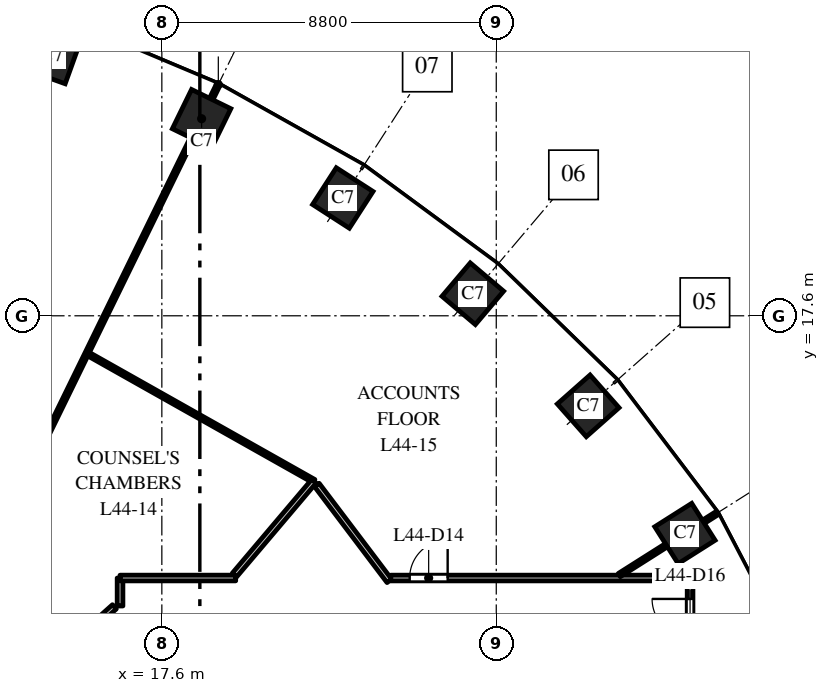
"""IFC4 building model, lengths in metres.
Left out: names, types, materials, properties, quantities, classifications, styles, units other than length and angle.
Written with IfcOpenShell. Run it as: python <this file> out.ifc"""

import sys

from ifc_helpers import new_model, si_unit, direction, frame, frame_2d, origin, origin_2d, place, context, subcontext, project, spatial, rectangle, extrude, element, fill, save


model = new_model("IFC4")
c1 = context("Model", 3, precision=1e-05, world=origin(), true_north=direction((0.0, 1.0)))
c2 = subcontext(c1, "Body", "Model", "MODEL_VIEW")
j1 = project(units=[si_unit("LENGTHUNIT", "METRE"), si_unit("PLANEANGLEUNIT", "RADIAN")], contexts=[c1])
p1 = place(None, origin())
s1 = spatial("IfcSite", under=j1, at=p1, CompositionType="ELEMENT")
p2 = place(p1, origin())
s2 = spatial("IfcBuilding", under=s1, at=p2, CompositionType="ELEMENT")
p3 = place(p2, frame((0.0, 0.0, 190.0)))
s3 = spatial("IfcBuildingStorey", under=s2, at=p3, CompositionType="ELEMENT", Elevation=190.0)
for number, where, z_axis, x_axis in (
    (1, (31.365, 11.871, 0.0), (0.0, 0.0, 1.0), (-0.535, 0.845, 0.0)),
    (2, (28.819, 15.23, 0.0), (0.0, 0.0, 1.0), (-0.663, 0.749, 0.0)),
    (3, (25.783, 18.18, 0.0), (0.0, 0.0, 1.0), (-0.763, 0.646, 0.0)),
    (4, (22.362, 20.7, 0.0), (0.0, 0.0, 1.0), (-0.84, 0.542, 0.0)),
    (5, (18.646, 22.785, 0.0), (0.0, 0.0, 1.0), (-0.898, 0.439, 0.0)),
    (6, (14.709, 24.441, 0.0), (0.0, 0.0, 1.0), (-0.941, 0.338, 0.0)),
):
    element("IfcColumn", number, at=place(p3, frame(where, z_axis=z_axis, x_axis=x_axis)), inside=s3, PredefinedType="COLUMN", context=c2, shape_type="SweptSolid", body=[
        extrude(rectangle(XDim=1.15, YDim=1.15, at=origin_2d()), origin(), (0.0, 0.0, 1.0), 4.0),
    ])
p4 = place(p3, frame((12.769, 10.765, 0.0), z_axis=(0.0, 0.0, 1.0), x_axis=(0.439230835686, 0.898374238824, 0.0)))
e7 = element("IfcWall", 7, at=p4, inside=s3, PredefinedType="PARTITIONING", context=c2, shape_type="SweptSolid", body=[
    extrude(rectangle(XDim=14.382, YDim=0.1, at=frame_2d((7.191, 0.0))), origin(), (0.0, 0.0, 1.0), 2.9),
])
p5 = place(p3, frame((15.673, 16.589, 0.0), z_axis=(0.0, 0.0, 1.0), x_axis=(0.871231423664, -0.490872495074, 0.0)))
e8 = element("IfcWall", 8, at=p5, inside=s3, PredefinedType="PARTITIONING", context=c2, shape_type="SweptSolid", body=[
    extrude(rectangle(XDim=6.806, YDim=0.1, at=frame_2d((3.403, 0.0))), origin(), (0.0, 0.0, 1.0), 3.7),
])
p6 = place(p3, frame((16.5, 9.964, 0.0), z_axis=(0.0, 0.0, 1.0), x_axis=(0.0, 1.0, 0.0)))
e9 = element("IfcWall", 9, at=p6, inside=s3, PredefinedType="PARTITIONING", context=c2, shape_type="SweptSolid", body=[
    extrude(rectangle(XDim=0.736, YDim=0.15, at=frame_2d((0.368, 0.0))), origin(), (0.0, 0.0, 1.0), 3.7),
])
p7 = place(p3, frame((16.5, 10.7, 0.0), z_axis=(0.0, 0.0, 1.0), x_axis=(1.0, 0.0, 0.0)))
e10 = element("IfcWall", 10, at=p7, inside=s3, PredefinedType="PARTITIONING", context=c2, shape_type="SweptSolid", body=[
    extrude(rectangle(XDim=3.043, YDim=0.15, at=frame_2d((1.521, 0.0))), origin(), (0.0, 0.0, 1.0), 3.7),
])
p8 = place(p3, frame((19.511, 10.778, 0.0), z_axis=(0.0, 0.0, 1.0), x_axis=(0.646314086505, 0.763071491792, 0.0)))
e11 = element("IfcWall", 11, at=p8, inside=s3, PredefinedType="PARTITIONING", context=c2, shape_type="SweptSolid", body=[
    extrude(rectangle(XDim=3.237, YDim=0.15, at=frame_2d((1.618, 0.0))), origin(), (0.0, 0.0, 1.0), 3.7),
])
p9 = place(p3, frame((21.679, 13.148, 0.0), z_axis=(0.0, 0.0, 1.0), x_axis=(0.602984875358, -0.797752618353, 0.0)))
e12 = element("IfcWall", 12, at=p9, inside=s3, PredefinedType="PARTITIONING", context=c2, shape_type="SweptSolid", body=[
    extrude(rectangle(XDim=3.163, YDim=0.15, at=frame_2d((1.581, 0.0))), origin(), (0.0, 0.0, 1.0), 2.75),
])
p10 = place(p3, frame((23.623, 10.7, 0.0), z_axis=(0.0, 0.0, 1.0), x_axis=(1.0, 0.0, 0.0)))
e13 = element("IfcWall", 13, at=p10, inside=s3, PredefinedType="PARTITIONING", context=c2, shape_type="SweptSolid", body=[
    extrude(rectangle(XDim=7.877, YDim=0.15, at=frame_2d((3.938, 0.0))), origin(), (0.0, 0.0, 1.0), 2.9),
])
p11 = place(p10, frame((0.498, 0.0, 0.0)))
e14 = element("IfcOpeningElement", 14, at=p11, cuts=e13, PredefinedType="OPENING", context=c2, shape_type="SweptSolid", body=[
    extrude(rectangle(XDim=1.0, YDim=2.1, at=frame_2d((0.5, 1.05))), frame((0.0, 0.085, 0.0), z_axis=(0.0, -1.0, 0.0), x_axis=(1.0, 0.0, 0.0)), (0.0, 0.0, 1.0), 0.17),
])
p12 = place(p3, frame((29.637, 10.777, 0.0), z_axis=(0.0, 0.0, 1.0), x_axis=(0.844810627195, 0.535065420467, 0.0)))
e15 = element("IfcWall", 15, at=p12, inside=s3, PredefinedType="PARTITIONING", context=c2, shape_type="SweptSolid", body=[
    extrude(rectangle(XDim=3.048, YDim=0.1, at=frame_2d((1.524, 0.0))), origin(), (0.0, 0.0, 1.0), 2.9),
])
p13 = place(p3, frame((31.5, 8.5, 0.0), z_axis=(0.0, 0.0, 1.0), x_axis=(0.0, 1.0, 0.0)))
e16 = element("IfcWall", 16, at=p13, inside=s3, PredefinedType="PARTITIONING", context=c2, shape_type="SweptSolid", body=[
    extrude(rectangle(XDim=2.2, YDim=0.15, at=frame_2d((1.1, 0.0))), origin(), (0.0, 0.0, 1.0), 2.9),
])
p14 = place(p13, frame((0.65, 0.0, 0.0)))
e17 = element("IfcOpeningElement", 17, at=p14, cuts=e16, PredefinedType="OPENING", context=c2, shape_type="SweptSolid", body=[
    extrude(rectangle(XDim=1.0, YDim=2.1, at=frame_2d((0.5, 1.05))), frame((0.0, 0.085, 0.0), z_axis=(0.0, -1.0, 0.0), x_axis=(1.0, 0.0, 0.0)), (0.0, 0.0, 1.0), 0.17),
])
p15 = place(p3, frame((15.084, 8.806, 0.0), z_axis=(0.0, 0.0, 1.0), x_axis=(0.744832366149, 0.667251636444, 0.0)))
e18 = element("IfcWall", 18, at=p15, inside=s3, PredefinedType="PARTITIONING", context=c2, shape_type="SweptSolid", body=[
    extrude(rectangle(XDim=1.702, YDim=0.15, at=frame_2d((0.851, 0.0))), origin(), (0.0, 0.0, 1.0), 3.7),
])
p16 = place(p11, origin())
e19 = element("IfcDoor", 19, at=p16, inside=s3, OperationType="SINGLE_SWING_RIGHT", PredefinedType="DOOR", context=c2, shape_type="SweptSolid", body=[
    extrude(rectangle(XDim=1.0, YDim=2.1, at=frame_2d((0.5, 1.05))), frame((0.0, 0.025, 0.0), z_axis=(0.0, -1.0, 0.0), x_axis=(1.0, 0.0, 0.0)), (0.0, 0.0, 1.0), 0.05),
])
fill(e14, e19)
p17 = place(p14, origin())
e20 = element("IfcDoor", 20, at=p17, inside=s3, OperationType="SINGLE_SWING_RIGHT", PredefinedType="DOOR", context=c2, shape_type="SweptSolid", body=[
    extrude(rectangle(XDim=1.0, YDim=2.1, at=frame_2d((0.5, 1.05))), frame((0.0, 0.025, 0.0), z_axis=(0.0, -1.0, 0.0), x_axis=(1.0, 0.0, 0.0)), (0.0, 0.0, 1.0), 0.05),
])
fill(e17, e20)
save(model, sys.argv[1])
